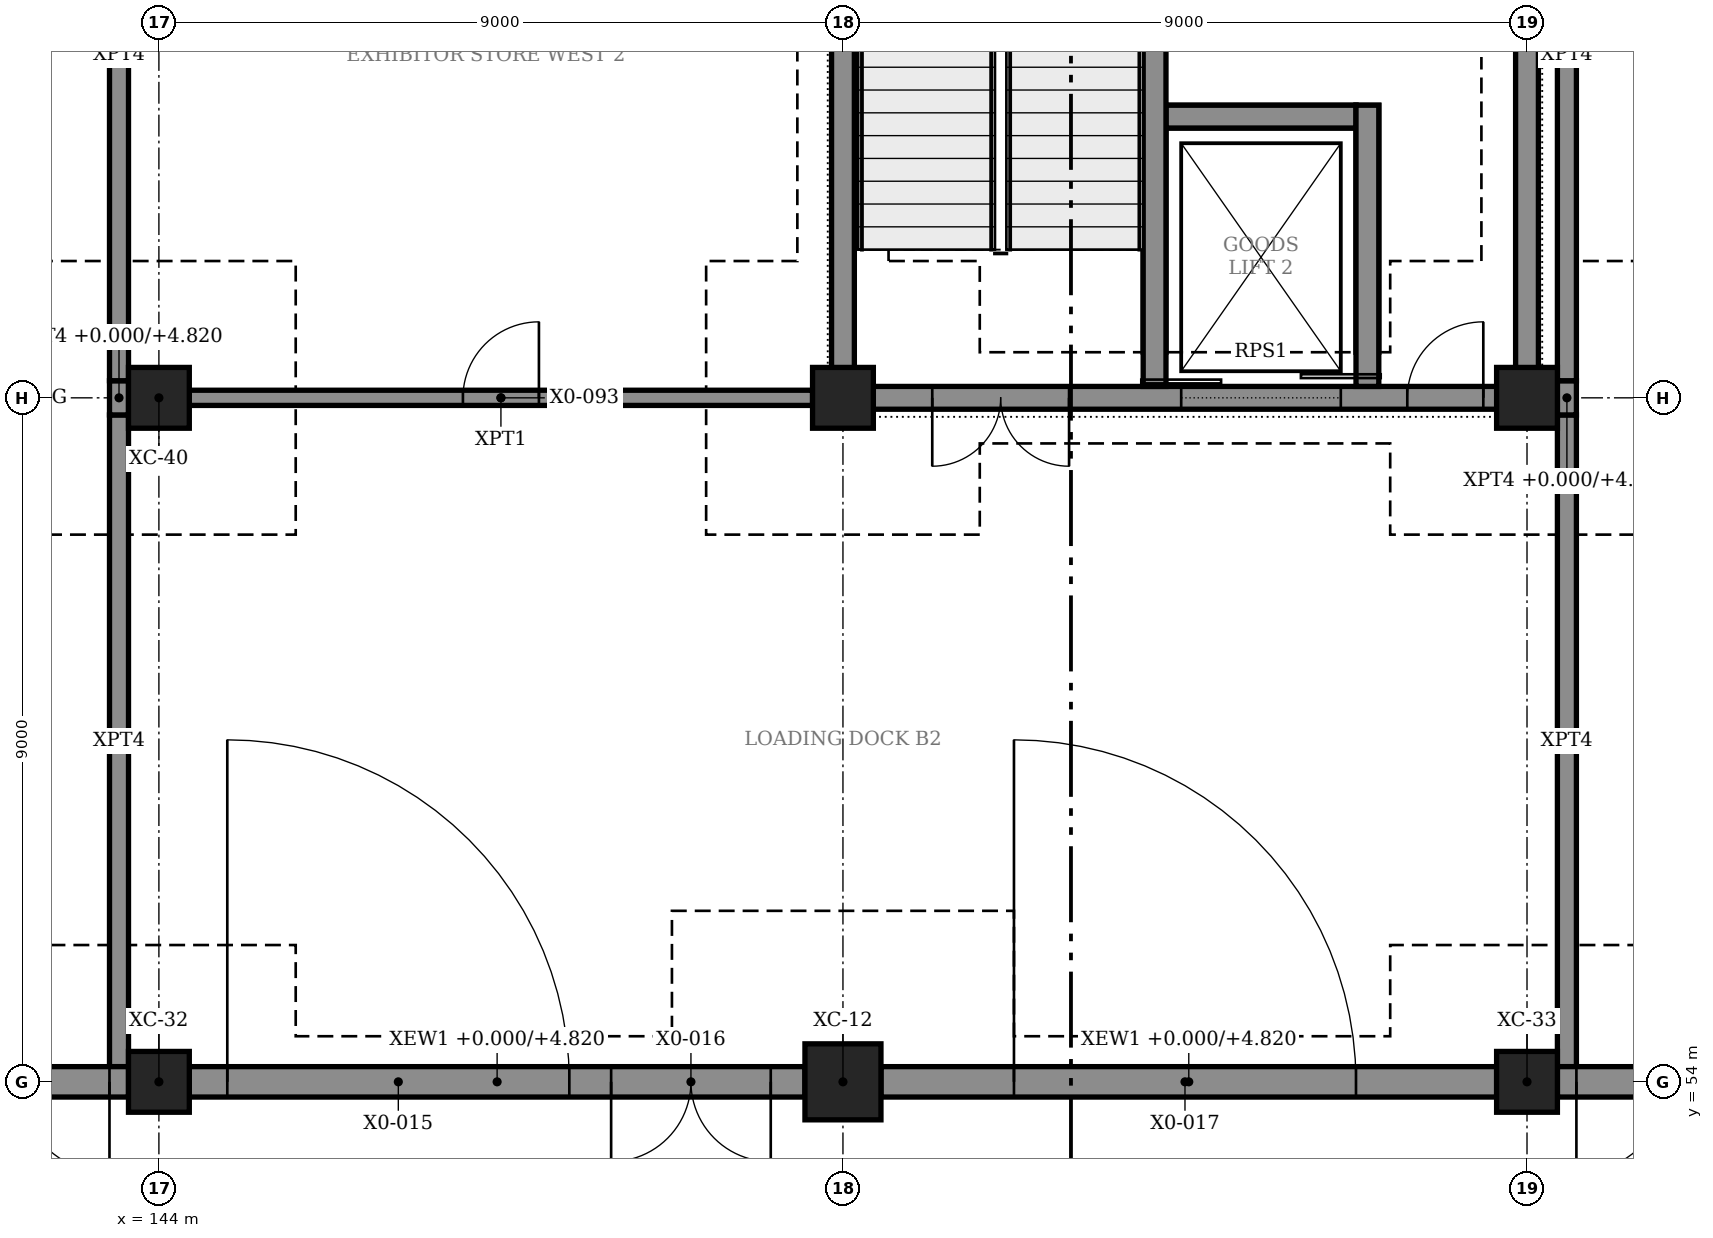
"""IFC4 building model, lengths in metres.
Left out: names, types, materials, properties, quantities, classifications, styles, units other than length and angle.
Written with IfcOpenShell. Run it as: python <this file> out.ifc"""

import sys

from ifc_helpers import new_model, si_unit, direction, frame, frame_2d, origin, origin_2d, place, context, subcontext, project, spatial, rectangle, hollow_rectangle, extrude, element, fill, save


model = new_model("IFC4")
c1 = context("Model", 3, precision=1e-05, world=origin(), true_north=direction((0.0, 1.0)))
c2 = subcontext(c1, "Body", "Model", "MODEL_VIEW")
j1 = project(units=[si_unit("LENGTHUNIT", "METRE"), si_unit("PLANEANGLEUNIT", "RADIAN")], contexts=[c1])
p1 = place(None, origin())
s1 = spatial("IfcSite", under=j1, at=p1, CompositionType="ELEMENT")
p2 = place(p1, origin())
s2 = spatial("IfcBuilding", under=s1, at=p2, CompositionType="ELEMENT")
p3 = place(p2, origin())
s3 = spatial("IfcBuildingStorey", under=s2, at=p3, CompositionType="ELEMENT", Elevation=0.0)
p4 = place(p3, frame((153.0, 54.0, 0.0), z_axis=(0.0, 0.0, 1.0), x_axis=(1.0, 0.0, 0.0)))
e1 = element("IfcColumn", 1, at=p4, inside=s3, PredefinedType="COLUMN", context=c2, shape_type="SweptSolid", body=[
    extrude(hollow_rectangle(XDim=1.0, YDim=1.0, WallThickness=0.032, at=origin_2d()), origin(), (0.0, 0.0, 1.0), 6.0),
])
for number, where, z_axis, x_axis in (
    (2, (144.0, 54.0, 0.0), (0.0, 0.0, 1.0), (1.0, 0.0, 0.0)),
    (3, (162.0, 54.0, 0.0), (0.0, 0.0, 1.0), (1.0, 0.0, 0.0)),
    (4, (144.0, 63.0, 0.0), (0.0, 0.0, 1.0), (1.0, 0.0, 0.0)),
    (5, (153.0, 63.0, 0.0), (0.0, 0.0, 1.0), (1.0, 0.0, 0.0)),
    (6, (162.0, 63.0, 0.0), (0.0, 0.0, 1.0), (1.0, 0.0, 0.0)),
):
    element("IfcColumn", number, at=place(p3, frame(where, z_axis=z_axis, x_axis=x_axis)), inside=s3, PredefinedType="COLUMN", context=c2, shape_type="SweptSolid", body=[
        extrude(rectangle(XDim=0.8, YDim=0.8, at=origin_2d()), origin(), (0.0, 0.0, 1.0), 6.0),
    ])
p5 = place(p3, frame((152.85, 63.0, 0.0), z_axis=(0.0, 0.0, 1.0), x_axis=(1.0, 0.0, 0.0)))
e7 = element("IfcWall", 7, at=p5, inside=s3, PredefinedType="SHEAR", context=c2, shape_type="SweptSolid", body=[
    extrude(rectangle(XDim=9.3, YDim=0.3, at=frame_2d((4.65, 0.0))), origin(), (0.0, 0.0, 1.0), 6.0),
])
p6 = place(p5, frame((1.325, 0.0, 0.0)))
e8 = element("IfcOpeningElement", 8, at=p6, cuts=e7, PredefinedType="OPENING", context=c2, shape_type="SweptSolid", body=[
    extrude(rectangle(XDim=1.8, YDim=2.4, at=frame_2d((0.9, 1.2))), frame((0.0, 0.16, 0.0), z_axis=(0.0, -1.0, 0.0), x_axis=(1.0, 0.0, 0.0)), (0.0, 0.0, 1.0), 0.32),
])
p7 = place(p5, frame((4.6, 0.0, 0.0)))
e9 = element("IfcOpeningElement", 9, at=p7, cuts=e7, PredefinedType="OPENING", context=c2, shape_type="SweptSolid", body=[
    extrude(rectangle(XDim=2.1, YDim=2.4, at=frame_2d((1.05, 1.2))), frame((0.0, 0.16, 0.0), z_axis=(0.0, -1.0, 0.0), x_axis=(1.0, 0.0, 0.0)), (0.0, 0.0, 1.0), 0.32),
])
p8 = place(p5, frame((7.575, 0.0, 0.0)))
e10 = element("IfcOpeningElement", 10, at=p8, cuts=e7, PredefinedType="OPENING", context=c2, shape_type="SweptSolid", body=[
    extrude(rectangle(XDim=1.0, YDim=2.4, at=frame_2d((0.5, 1.2))), frame((0.0, 0.16, 0.0), z_axis=(0.0, -1.0, 0.0), x_axis=(1.0, 0.0, 0.0)), (0.0, 0.0, 1.0), 0.32),
])
for number, where, z_axis, x_axis in (
    (11, (153.0, 63.15, 0.0), (0.0, 0.0, 1.0), (0.0, 1.0, 0.0)),
    (12, (162.0, 63.15, 0.0), (0.0, 0.0, 1.0), (0.0, 1.0, 0.0)),
):
    element("IfcWall", number, at=place(p3, frame(where, z_axis=z_axis, x_axis=x_axis)), inside=s3, PredefinedType="SHEAR", context=c2, shape_type="SweptSolid", body=[
        extrude(rectangle(XDim=8.65, YDim=0.3, at=frame_2d((4.325, 0.0))), origin(), (0.0, 0.0, 1.0), 6.0),
    ])
p9 = place(p3, frame((135.5, 54.0, 0.0), z_axis=(0.0, 0.0, 1.0), x_axis=(1.0, 0.0, 0.0)))
e13 = element("IfcWall", 13, at=p9, inside=s3, PredefinedType="SOLIDWALL", context=c2, shape_type="SweptSolid", body=[
    extrude(rectangle(XDim=8.1, YDim=0.4, at=frame_2d((4.05, 0.0))), origin(), (0.0, 0.0, 1.0), 4.82),
])
p10 = place(p9, frame((0.25, 0.0, 0.0)))
e14 = element("IfcOpeningElement", 14, at=p10, cuts=e13, PredefinedType="OPENING", context=c2, shape_type="SweptSolid", body=[
    extrude(rectangle(XDim=4.5, YDim=4.5, at=frame_2d((2.25, 2.25))), frame((0.0, 0.21, 0.0), z_axis=(0.0, -1.0, 0.0), x_axis=(1.0, 0.0, 0.0)), (0.0, 0.0, 1.0), 0.42),
])
p11 = place(p9, frame((5.45, 0.0, 0.0)))
e15 = element("IfcOpeningElement", 15, at=p11, cuts=e13, PredefinedType="OPENING", context=c2, shape_type="SweptSolid", body=[
    extrude(rectangle(XDim=2.4, YDim=2.4, at=frame_2d((1.2, 1.2))), frame((0.0, 0.21, 0.0), z_axis=(0.0, -1.0, 0.0), x_axis=(1.0, 0.0, 0.0)), (0.0, 0.0, 1.0), 0.42),
])
p12 = place(p3, frame((144.4, 54.0, 0.0), z_axis=(0.0, 0.0, 1.0), x_axis=(1.0, 0.0, 0.0)))
e16 = element("IfcWall", 16, at=p12, inside=s3, PredefinedType="SOLIDWALL", context=c2, shape_type="SweptSolid", body=[
    extrude(rectangle(XDim=8.1, YDim=0.4, at=frame_2d((4.05, 0.0))), origin(), (0.0, 0.0, 1.0), 4.82),
])
p13 = place(p12, frame((0.5, 0.0, 0.0)))
e17 = element("IfcOpeningElement", 17, at=p13, cuts=e16, PredefinedType="OPENING", context=c2, shape_type="SweptSolid", body=[
    extrude(rectangle(XDim=4.5, YDim=4.5, at=frame_2d((2.25, 2.25))), frame((0.0, 0.21, 0.0), z_axis=(0.0, -1.0, 0.0), x_axis=(1.0, 0.0, 0.0)), (0.0, 0.0, 1.0), 0.42),
])
p14 = place(p12, frame((5.55, 0.0, 0.0)))
e18 = element("IfcOpeningElement", 18, at=p14, cuts=e16, PredefinedType="OPENING", context=c2, shape_type="SweptSolid", body=[
    extrude(rectangle(XDim=2.1, YDim=2.4, at=frame_2d((1.05, 1.2))), frame((0.0, 0.21, 0.0), z_axis=(0.0, -1.0, 0.0), x_axis=(1.0, 0.0, 0.0)), (0.0, 0.0, 1.0), 0.42),
])
p15 = place(p3, frame((153.5, 54.0, 0.0), z_axis=(0.0, 0.0, 1.0), x_axis=(1.0, 0.0, 0.0)))
e19 = element("IfcWall", 19, at=p15, inside=s3, PredefinedType="SOLIDWALL", context=c2, shape_type="SweptSolid", body=[
    extrude(rectangle(XDim=8.1, YDim=0.4, at=frame_2d((4.05, 0.0))), origin(), (0.0, 0.0, 1.0), 4.82),
])
p16 = place(p15, frame((1.75, 0.0, 0.0)))
e20 = element("IfcOpeningElement", 20, at=p16, cuts=e19, PredefinedType="OPENING", context=c2, shape_type="SweptSolid", body=[
    extrude(rectangle(XDim=4.5, YDim=4.5, at=frame_2d((2.25, 2.25))), frame((0.0, 0.21, 0.0), z_axis=(0.0, -1.0, 0.0), x_axis=(1.0, 0.0, 0.0)), (0.0, 0.0, 1.0), 0.42),
])
p17 = place(p3, frame((162.4, 54.0, 0.0), z_axis=(0.0, 0.0, 1.0), x_axis=(1.0, 0.0, 0.0)))
e21 = element("IfcWall", 21, at=p17, inside=s3, PredefinedType="SOLIDWALL", context=c2, shape_type="SweptSolid", body=[
    extrude(rectangle(XDim=8.1, YDim=0.4, at=frame_2d((4.05, 0.0))), origin(), (0.0, 0.0, 1.0), 4.82),
])
p18 = place(p17, frame((3.15, 0.0, 0.0)))
e22 = element("IfcOpeningElement", 22, at=p18, cuts=e21, PredefinedType="OPENING", context=c2, shape_type="SweptSolid", body=[
    extrude(rectangle(XDim=4.5, YDim=4.5, at=frame_2d((2.25, 2.25))), frame((0.0, 0.21, 0.0), z_axis=(0.0, -1.0, 0.0), x_axis=(1.0, 0.0, 0.0)), (0.0, 0.0, 1.0), 0.42),
])
p19 = place(p17, frame((0.25, 0.0, 0.0)))
e23 = element("IfcOpeningElement", 23, at=p19, cuts=e21, PredefinedType="OPENING", context=c2, shape_type="SweptSolid", body=[
    extrude(rectangle(XDim=2.4, YDim=2.4, at=frame_2d((1.2, 1.2))), frame((0.0, 0.21, 0.0), z_axis=(0.0, -1.0, 0.0), x_axis=(1.0, 0.0, 0.0)), (0.0, 0.0, 1.0), 0.42),
])
p20 = place(p3, frame((157.1, 63.15, 0.0), z_axis=(0.0, 0.0, 1.0), x_axis=(0.0, 1.0, 0.0)))
e24 = element("IfcWall", 24, at=p20, inside=s3, PredefinedType="SHEAR", context=c2, shape_type="SweptSolid", body=[
    extrude(rectangle(XDim=8.65, YDim=0.3, at=frame_2d((4.325, 0.0))), origin(), (0.0, 0.0, 1.0), 5.72),
])
p21 = place(p3, frame((159.9, 63.15, 0.0), z_axis=(0.0, 0.0, 1.0), x_axis=(0.0, 1.0, 0.0)))
e25 = element("IfcWall", 25, at=p21, inside=s3, PredefinedType="SHEAR", context=c2, shape_type="SweptSolid", body=[
    extrude(rectangle(XDim=3.7, YDim=0.3, at=frame_2d((1.85, 0.0))), origin(), (0.0, 0.0, 1.0), 5.72),
])
p22 = place(p3, frame((157.25, 66.7, 0.0), z_axis=(0.0, 0.0, 1.0), x_axis=(1.0, 0.0, 0.0)))
e26 = element("IfcWall", 26, at=p22, inside=s3, PredefinedType="SHEAR", context=c2, shape_type="SweptSolid", body=[
    extrude(rectangle(XDim=2.5, YDim=0.3, at=frame_2d((1.25, 0.0))), origin(), (0.0, 0.0, 1.0), 5.72),
])
for number, where, z_axis, x_axis in (
    (27, (157.1, 63.6, -1.4), (0.0, 0.0, 1.0), (0.0, 1.0, 0.0)),
    (28, (159.9, 63.6, -1.4), (0.0, 0.0, 1.0), (0.0, 1.0, 0.0)),
):
    element("IfcWall", number, at=place(p3, frame(where, z_axis=z_axis, x_axis=x_axis)), inside=s3, PredefinedType="SHEAR", context=c2, shape_type="SweptSolid", body=[
        extrude(rectangle(XDim=3.25, YDim=0.3, at=frame_2d((1.625, 0.0))), origin(), (0.0, 0.0, 1.0), 1.4),
    ])
p23 = place(p3, frame((157.25, 66.7, -1.4), z_axis=(0.0, 0.0, 1.0), x_axis=(1.0, 0.0, 0.0)))
e29 = element("IfcWall", 29, at=p23, inside=s3, PredefinedType="SHEAR", context=c2, shape_type="SweptSolid", body=[
    extrude(rectangle(XDim=2.5, YDim=0.3, at=frame_2d((1.25, 0.0))), origin(), (0.0, 0.0, 1.0), 1.4),
])
p24 = place(p3, frame((144.4, 63.0, 0.0), z_axis=(0.0, 0.0, 1.0), x_axis=(1.0, 0.0, 0.0)))
e30 = element("IfcWall", 30, at=p24, inside=s3, PredefinedType="PARTITIONING", context=c2, shape_type="SweptSolid", body=[
    extrude(rectangle(XDim=8.2, YDim=0.2, at=frame_2d((4.1, 0.0))), origin(), (0.0, 0.0, 1.0), 4.82),
])
p25 = place(p24, frame((3.6, 0.0, 0.015)))
e31 = element("IfcOpeningElement", 31, at=p25, cuts=e30, PredefinedType="OPENING", context=c2, shape_type="SweptSolid", body=[
    extrude(rectangle(XDim=1.0, YDim=2.4, at=frame_2d((0.5, 1.2))), frame((0.0, 0.11, 0.0), z_axis=(0.0, -1.0, 0.0), x_axis=(1.0, 0.0, 0.0)), (0.0, 0.0, 1.0), 0.22),
])
p26 = place(p3, frame((143.475, 54.2, 0.0), z_axis=(0.0, 0.0, 1.0), x_axis=(0.0, 1.0, 0.0)))
e32 = element("IfcWall", 32, at=p26, inside=s3, PredefinedType="PARTITIONING", context=c2, shape_type="SweptSolid", body=[
    extrude(rectangle(XDim=8.575, YDim=0.25, at=frame_2d((4.288, 0.0))), origin(), (0.0, 0.0, 1.0), 5.72),
])
p27 = place(p3, frame((143.475, 62.775, 0.0), z_axis=(0.0, 0.0, 1.0), x_axis=(0.0, 1.0, 0.0)))
e33 = element("IfcWall", 33, at=p27, inside=s3, PredefinedType="PARTITIONING", context=c2, shape_type="SweptSolid", body=[
    extrude(rectangle(XDim=0.45, YDim=0.25, at=frame_2d((0.225, 0.0))), origin(), (0.0, 0.0, 1.0), 4.82),
])
for number, where, z_axis, x_axis in (
    (34, (143.475, 63.225, 0.0), (0.0, 0.0, 1.0), (0.0, 1.0, 0.0)),
    (35, (162.525, 54.2, 0.0), (0.0, 0.0, 1.0), (0.0, 1.0, 0.0)),
):
    element("IfcWall", number, at=place(p3, frame(where, z_axis=z_axis, x_axis=x_axis)), inside=s3, PredefinedType="PARTITIONING", context=c2, shape_type="SweptSolid", body=[
        extrude(rectangle(XDim=8.575, YDim=0.25, at=frame_2d((4.288, 0.0))), origin(), (0.0, 0.0, 1.0), 5.72),
    ])
p28 = place(p3, frame((162.525, 62.775, 0.0), z_axis=(0.0, 0.0, 1.0), x_axis=(0.0, 1.0, 0.0)))
e36 = element("IfcWall", 36, at=p28, inside=s3, PredefinedType="PARTITIONING", context=c2, shape_type="SweptSolid", body=[
    extrude(rectangle(XDim=0.45, YDim=0.25, at=frame_2d((0.225, 0.0))), origin(), (0.0, 0.0, 1.0), 4.82),
])
p29 = place(p3, frame((162.525, 63.225, 0.0), z_axis=(0.0, 0.0, 1.0), x_axis=(0.0, 1.0, 0.0)))
e37 = element("IfcWall", 37, at=p29, inside=s3, PredefinedType="PARTITIONING", context=c2, shape_type="SweptSolid", body=[
    extrude(rectangle(XDim=8.575, YDim=0.25, at=frame_2d((4.288, 0.0))), origin(), (0.0, 0.0, 1.0), 5.72),
])
p30 = place(p13, origin())
e38 = element("IfcDoor", 38, at=p30, inside=s3, OperationType="ROLLINGUP", PredefinedType="DOOR", context=c2, shape_type="SweptSolid", body=[
    extrude(rectangle(XDim=4.5, YDim=4.5, at=frame_2d((2.25, 2.25))), frame((0.0, 0.025, 0.0), z_axis=(0.0, -1.0, 0.0), x_axis=(1.0, 0.0, 0.0)), (0.0, 0.0, 1.0), 0.05),
])
fill(e17, e38)
p31 = place(p14, frame((2.1, 0.0, 0.0), z_axis=(0.0, 0.0, 1.0), x_axis=(-1.0, 0.0, 0.0)))
e39 = element("IfcDoor", 39, at=p31, inside=s3, OperationType="DOUBLE_DOOR_SINGLE_SWING", PredefinedType="DOOR", context=c2, shape_type="SweptSolid", body=[
    extrude(rectangle(XDim=2.1, YDim=2.4, at=frame_2d((1.05, 1.2))), frame((0.0, 0.025, 0.0), z_axis=(0.0, -1.0, 0.0), x_axis=(1.0, 0.0, 0.0)), (0.0, 0.0, 1.0), 0.05),
])
fill(e18, e39)
p32 = place(p16, origin())
e40 = element("IfcDoor", 40, at=p32, inside=s3, OperationType="ROLLINGUP", PredefinedType="DOOR", context=c2, shape_type="SweptSolid", body=[
    extrude(rectangle(XDim=4.5, YDim=4.5, at=frame_2d((2.25, 2.25))), frame((0.0, 0.025, 0.0), z_axis=(0.0, -1.0, 0.0), x_axis=(1.0, 0.0, 0.0)), (0.0, 0.0, 1.0), 0.05),
])
fill(e20, e40)
p33 = place(p11, frame((2.4, 0.0, 0.0), z_axis=(0.0, 0.0, 1.0), x_axis=(-1.0, 0.0, 0.0)))
e41 = element("IfcDoor", 41, at=p33, inside=s3, OperationType="DOUBLE_DOOR_SINGLE_SWING", PredefinedType="DOOR", context=c2, shape_type="SweptSolid", body=[
    extrude(rectangle(XDim=2.4, YDim=2.4, at=frame_2d((1.2, 1.2))), frame((0.0, 0.025, 0.0), z_axis=(0.0, -1.0, 0.0), x_axis=(1.0, 0.0, 0.0)), (0.0, 0.0, 1.0), 0.05),
])
fill(e15, e41)
p34 = place(p19, frame((2.4, 0.0, 0.0), z_axis=(0.0, 0.0, 1.0), x_axis=(-1.0, 0.0, 0.0)))
e42 = element("IfcDoor", 42, at=p34, inside=s3, OperationType="DOUBLE_DOOR_SINGLE_SWING", PredefinedType="DOOR", context=c2, shape_type="SweptSolid", body=[
    extrude(rectangle(XDim=2.4, YDim=2.4, at=frame_2d((1.2, 1.2))), frame((0.0, 0.025, 0.0), z_axis=(0.0, -1.0, 0.0), x_axis=(1.0, 0.0, 0.0)), (0.0, 0.0, 1.0), 0.05),
])
fill(e23, e42)
p35 = place(p25, origin())
e43 = element("IfcDoor", 43, at=p35, inside=s3, OperationType="SINGLE_SWING_RIGHT", PredefinedType="DOOR", context=c2, shape_type="SweptSolid", body=[
    extrude(rectangle(XDim=1.0, YDim=2.4, at=frame_2d((0.5, 1.2))), frame((0.0, 0.025, 0.0), z_axis=(0.0, -1.0, 0.0), x_axis=(1.0, 0.0, 0.0)), (0.0, 0.0, 1.0), 0.05),
])
fill(e31, e43)
p36 = place(p6, frame((1.8, 0.0, 0.0), z_axis=(0.0, 0.0, 1.0), x_axis=(-1.0, 0.0, 0.0)))
e44 = element("IfcDoor", 44, at=p36, inside=s3, OperationType="DOUBLE_DOOR_SINGLE_SWING", PredefinedType="DOOR", context=c2, shape_type="SweptSolid", body=[
    extrude(rectangle(XDim=1.8, YDim=2.4, at=frame_2d((0.9, 1.2))), frame((0.0, 0.025, 0.0), z_axis=(0.0, -1.0, 0.0), x_axis=(1.0, 0.0, 0.0)), (0.0, 0.0, 1.0), 0.05),
])
fill(e8, e44)
p37 = place(p7, origin())
e45 = element("IfcDoor", 45, at=p37, inside=s3, OperationType="DOUBLE_DOOR_SLIDING", PredefinedType="DOOR", context=c2, shape_type="SweptSolid", body=[
    extrude(rectangle(XDim=2.1, YDim=2.4, at=frame_2d((1.05, 1.2))), frame((0.0, 0.025, 0.0), z_axis=(0.0, -1.0, 0.0), x_axis=(1.0, 0.0, 0.0)), (0.0, 0.0, 1.0), 0.05),
])
fill(e9, e45)
p38 = place(p8, origin())
e46 = element("IfcDoor", 46, at=p38, inside=s3, OperationType="SINGLE_SWING_RIGHT", PredefinedType="DOOR", context=c2, shape_type="SweptSolid", body=[
    extrude(rectangle(XDim=1.0, YDim=2.4, at=frame_2d((0.5, 1.2))), frame((0.0, 0.025, 0.0), z_axis=(0.0, -1.0, 0.0), x_axis=(1.0, 0.0, 0.0)), (0.0, 0.0, 1.0), 0.05),
])
fill(e10, e46)
save(model, sys.argv[1])
